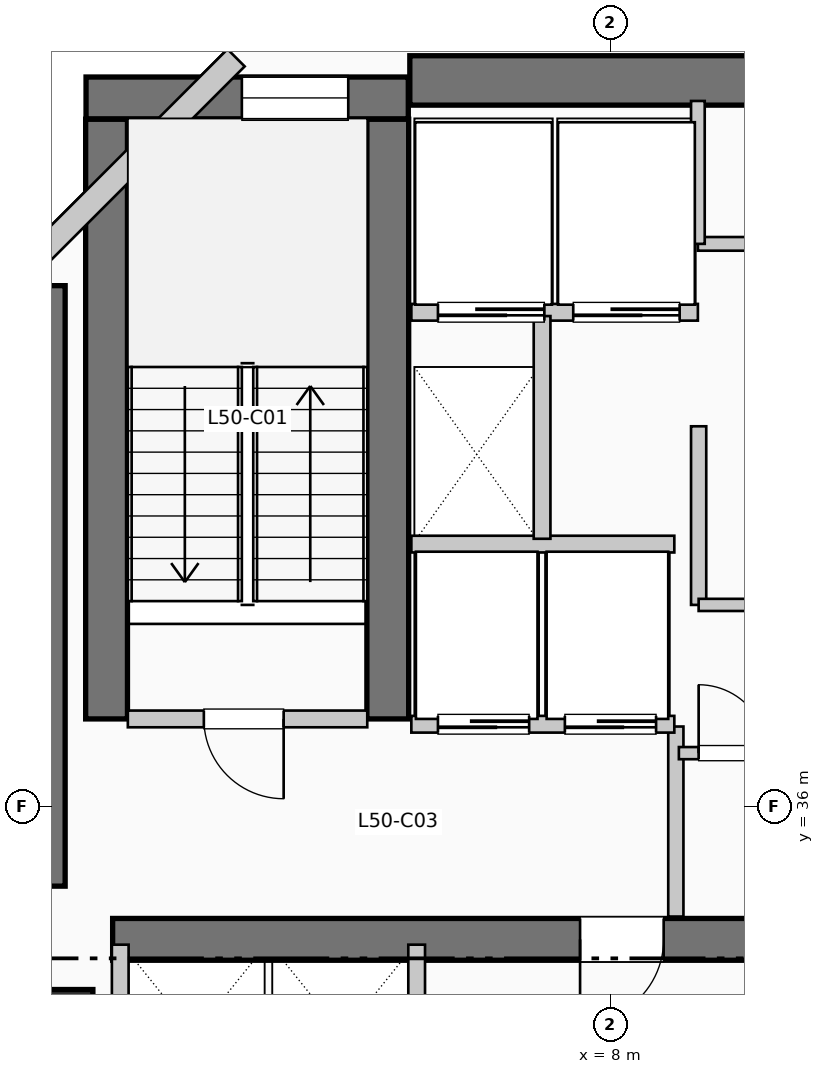
"""IFC4 building model, lengths in metres.
Left out: names, types, materials, properties, quantities, classifications, styles, units other than length and angle.
Written with IfcOpenShell. Run it as: python <this file> out.ifc"""

import sys

from ifc_helpers import new_model, si_unit, direction, frame, frame_2d, origin, origin_2d, place, context, subcontext, project, spatial, rectangle, extrude, element, fill, save


model = new_model("IFC4")
c1 = context("Model", 3, precision=1e-05, world=origin(), true_north=direction((0.0, 1.0)))
c2 = subcontext(c1, "Body", "Model", "MODEL_VIEW")
j1 = project(units=[si_unit("LENGTHUNIT", "METRE"), si_unit("PLANEANGLEUNIT", "RADIAN")], contexts=[c1])
p1 = place(None, origin())
s1 = spatial("IfcSite", under=j1, at=p1, CompositionType="ELEMENT")
p2 = place(p1, origin())
s2 = spatial("IfcBuilding", under=s1, at=p2, CompositionType="ELEMENT")
p3 = place(p2, frame((0.0, 0.0, 207.24)))
s3 = spatial("IfcBuildingStorey", under=s2, at=p3, CompositionType="ELEMENT", Elevation=207.24)
p4 = place(p3, frame((5.36, 45.55, 0.0), z_axis=(0.0, 0.0, 1.0), x_axis=(1.0, 0.0, 0.0)))
e1 = element("IfcWall", 1, at=p4, inside=s3, PredefinedType="SHEAR", context=c2, shape_type="SweptSolid", body=[
    extrude(rectangle(XDim=13.98, YDim=0.65, at=frame_2d((6.99, 0.0))), origin(), (0.0, 0.0, 1.0), 3.96),
])
p5 = place(p3, frame((0.5, 34.95, 0.0), z_axis=(0.0, 0.0, 1.0), x_axis=(0.0, 1.0, 0.0)))
e2 = element("IfcWall", 2, at=p5, inside=s3, PredefinedType="SHEAR", context=c2, shape_type="SweptSolid", body=[
    extrude(rectangle(XDim=7.9, YDim=0.65, at=frame_2d((3.95, 0.0))), origin(), (0.0, 0.0, 1.0), 3.96),
])
p6 = place(p3, frame((1.45, 34.25, 0.0), z_axis=(0.0, 0.0, 1.0), x_axis=(1.0, 0.0, 0.0)))
e3 = element("IfcWall", 3, at=p6, inside=s3, PredefinedType="SHEAR", context=c2, shape_type="SweptSolid", body=[
    extrude(rectangle(XDim=10.71, YDim=0.55, at=frame_2d((5.355, 0.0))), origin(), (0.0, 0.0, 1.0), 3.96),
])
p7 = place(p6, frame((7.25, 0.0, 0.0), z_axis=(0.0, 0.0, 1.0), x_axis=(-1.0, 0.0, 0.0)))
e4 = element("IfcOpeningElement", 4, at=p7, cuts=e3, PredefinedType="OPENING", context=c2, shape_type="SweptSolid", body=[
    extrude(rectangle(XDim=1.1, YDim=2.15, at=frame_2d((0.55, 1.075))), frame((0.0, 0.285, 0.0), z_axis=(0.0, -1.0, 0.0), x_axis=(1.0, 0.0, 0.0)), (0.0, 0.0, 1.0), 0.57),
])
for number, where, z_axis, x_axis in (
    (5, (1.37, 37.15, 0.0), (0.0, 0.0, 1.0), (0.0, 1.0, 0.0)),
    (6, (5.07, 37.15, 0.0), (0.0, 0.0, 1.0), (0.0, 1.0, 0.0)),
):
    element("IfcWall", number, at=place(p3, frame(where, z_axis=z_axis, x_axis=x_axis)), inside=s3, PredefinedType="SHEAR", context=c2, shape_type="SweptSolid", body=[
        extrude(rectangle(XDim=7.89, YDim=0.55, at=frame_2d((3.945, 0.0))), origin(), (0.0, 0.0, 1.0), 3.96),
    ])
p8 = place(p3, frame((1.1, 45.32, 0.0), z_axis=(0.0, 0.0, 1.0), x_axis=(1.0, 0.0, 0.0)))
e7 = element("IfcWall", 7, at=p8, inside=s3, PredefinedType="SHEAR", context=c2, shape_type="SweptSolid", body=[
    extrude(rectangle(XDim=4.24, YDim=0.55, at=frame_2d((2.12, 0.0))), origin(), (0.0, 0.0, 1.0), 3.96),
])
p9 = place(p8, frame((2.05, 0.0, 1.05)))
e8 = element("IfcOpeningElement", 8, at=p9, cuts=e7, PredefinedType="OPENING", context=c2, shape_type="SweptSolid", body=[
    extrude(rectangle(XDim=1.4, YDim=1.8, at=frame_2d((0.7, 0.9))), frame((0.0, 0.285, 0.0), z_axis=(0.0, -1.0, 0.0), x_axis=(1.0, 0.0, 0.0)), (0.0, 0.0, 1.0), 0.57),
])
p10 = place(p3, frame((0.8, 33.2, 0.0), z_axis=(0.0, 0.0, 1.0), x_axis=(1.0, 0.0, 0.0)))
e9 = element("IfcColumn", 9, at=p10, inside=s3, PredefinedType="COLUMN", context=c2, shape_type="SweptSolid", body=[
    extrude(rectangle(XDim=0.78, YDim=0.78, at=origin_2d()), origin(), (0.0, 0.0, 1.0), 3.96),
])
p11 = place(p3, frame((3.074, 45.848, 0.0), z_axis=(0.0, 0.0, 1.0), x_axis=(-0.707106781187, -0.707106781187, 0.0)))
e10 = element("IfcWall", 10, at=p11, inside=s3, PredefinedType="SOLIDWALL", context=c2, shape_type="SweptSolid", body=[
    extrude(rectangle(XDim=4.133, YDim=0.32, at=frame_2d((2.066, 0.0))), origin(), (0.0, 0.0, 1.0), 3.71),
])
p12 = place(p3, frame((1.65, 37.15, 0.0), z_axis=(0.0, 0.0, 1.0), x_axis=(1.0, 0.0, 0.0)))
e11 = element("IfcWall", 11, at=p12, inside=s3, PredefinedType="PARTITIONING", context=c2, shape_type="SweptSolid", body=[
    extrude(rectangle(XDim=3.15, YDim=0.22, at=frame_2d((1.575, 0.0))), origin(), (0.0, 0.0, 1.0), 3.71),
])
p13 = place(p12, frame((2.05, 0.0, 0.0), z_axis=(0.0, 0.0, 1.0), x_axis=(-1.0, 0.0, 0.0)))
e12 = element("IfcOpeningElement", 12, at=p13, cuts=e11, PredefinedType="OPENING", context=c2, shape_type="SweptSolid", body=[
    extrude(rectangle(XDim=1.05, YDim=2.15, at=frame_2d((0.525, 1.075))), frame((0.0, 0.12, 0.0), z_axis=(0.0, -1.0, 0.0), x_axis=(1.0, 0.0, 0.0)), (0.0, 0.0, 1.0), 0.24),
])
p14 = place(p3, frame((8.86, 34.55, 0.0), z_axis=(0.0, 0.0, 1.0), x_axis=(0.0, 1.0, 0.0)))
e13 = element("IfcWall", 13, at=p14, inside=s3, PredefinedType="PARTITIONING", context=c2, shape_type="SweptSolid", body=[
    extrude(rectangle(XDim=2.5, YDim=0.2, at=frame_2d((1.25, 0.0))), origin(), (0.0, 0.0, 1.0), 3.71),
])
p15 = place(p3, frame((5.38, 37.08, 0.0), z_axis=(0.0, 0.0, 1.0), x_axis=(1.0, 0.0, 0.0)))
e14 = element("IfcWall", 14, at=p15, inside=s3, PredefinedType="PARTITIONING", context=c2, shape_type="SweptSolid", body=[
    extrude(rectangle(XDim=3.46, YDim=0.22, at=frame_2d((1.73, 0.0))), origin(), (0.0, 0.0, 1.0), 3.71),
])
p16 = place(p15, frame((1.55, 0.0, 0.0), z_axis=(0.0, 0.0, 1.0), x_axis=(-1.0, 0.0, 0.0)))
e15 = element("IfcOpeningElement", 15, at=p16, cuts=e14, PredefinedType="OPENING", context=c2, shape_type="SweptSolid", body=[
    extrude(rectangle(XDim=1.2, YDim=2.2, at=frame_2d((0.6, 1.1))), frame((0.0, 0.12, 0.0), z_axis=(0.0, -1.0, 0.0), x_axis=(1.0, 0.0, 0.0)), (0.0, 0.0, 1.0), 0.24),
])
p17 = place(p15, frame((3.22, 0.0, 0.0), z_axis=(0.0, 0.0, 1.0), x_axis=(-1.0, 0.0, 0.0)))
e16 = element("IfcOpeningElement", 16, at=p17, cuts=e14, PredefinedType="OPENING", context=c2, shape_type="SweptSolid", body=[
    extrude(rectangle(XDim=1.2, YDim=2.2, at=frame_2d((0.6, 1.1))), frame((0.0, 0.12, 0.0), z_axis=(0.0, -1.0, 0.0), x_axis=(1.0, 0.0, 0.0)), (0.0, 0.0, 1.0), 0.24),
])
p18 = place(p3, frame((5.38, 39.45, 0.0), z_axis=(0.0, 0.0, 1.0), x_axis=(1.0, 0.0, 0.0)))
e17 = element("IfcWall", 17, at=p18, inside=s3, PredefinedType="PARTITIONING", context=c2, shape_type="SweptSolid", body=[
    extrude(rectangle(XDim=3.46, YDim=0.22, at=frame_2d((1.73, 0.0))), origin(), (0.0, 0.0, 1.0), 3.71),
])
p19 = place(p3, frame((5.38, 42.5, 0.0), z_axis=(0.0, 0.0, 1.0), x_axis=(1.0, 0.0, 0.0)))
e18 = element("IfcWall", 18, at=p19, inside=s3, PredefinedType="PARTITIONING", context=c2, shape_type="SweptSolid", body=[
    extrude(rectangle(XDim=3.77, YDim=0.22, at=frame_2d((1.885, 0.0))), origin(), (0.0, 0.0, 1.0), 3.71),
])
p20 = place(p19, frame((1.75, 0.0, 0.0), z_axis=(0.0, 0.0, 1.0), x_axis=(-1.0, 0.0, 0.0)))
e19 = element("IfcOpeningElement", 19, at=p20, cuts=e18, PredefinedType="OPENING", context=c2, shape_type="SweptSolid", body=[
    extrude(rectangle(XDim=1.4, YDim=2.2, at=frame_2d((0.7, 1.1))), frame((0.0, 0.12, 0.0), z_axis=(0.0, -1.0, 0.0), x_axis=(1.0, 0.0, 0.0)), (0.0, 0.0, 1.0), 0.24),
])
p21 = place(p19, frame((3.53, 0.0, 0.0), z_axis=(0.0, 0.0, 1.0), x_axis=(-1.0, 0.0, 0.0)))
e20 = element("IfcOpeningElement", 20, at=p21, cuts=e18, PredefinedType="OPENING", context=c2, shape_type="SweptSolid", body=[
    extrude(rectangle(XDim=1.4, YDim=2.2, at=frame_2d((0.7, 1.1))), frame((0.0, 0.12, 0.0), z_axis=(0.0, -1.0, 0.0), x_axis=(1.0, 0.0, 0.0)), (0.0, 0.0, 1.0), 0.24),
])
p22 = place(p3, frame((7.1, 39.52, 0.0), z_axis=(0.0, 0.0, 1.0), x_axis=(0.0, 1.0, 0.0)))
e21 = element("IfcWall", 21, at=p22, inside=s3, PredefinedType="PARTITIONING", context=c2, shape_type="SweptSolid", body=[
    extrude(rectangle(XDim=2.93, YDim=0.22, at=frame_2d((1.465, 0.0))), origin(), (0.0, 0.0, 1.0), 3.71),
])
for number, where, z_axis, x_axis in (
    (22, (1.55, 31.8, 0.0), (0.0, 0.0, 1.0), (0.0, 1.0, 0.0)),
    (23, (5.45, 31.8, 0.0), (0.0, 0.0, 1.0), (0.0, 1.0, 0.0)),
):
    element("IfcWall", number, at=place(p3, frame(where, z_axis=z_axis, x_axis=x_axis)), inside=s3, PredefinedType="PARTITIONING", context=c2, shape_type="SweptSolid", body=[
        extrude(rectangle(XDim=2.38, YDim=0.22, at=frame_2d((1.19, 0.0))), origin(), (0.0, 0.0, 1.0), 3.71),
    ])
p23 = place(p3, frame((9.16, 38.65, 0.0), z_axis=(0.0, 0.0, 1.0), x_axis=(0.0, 1.0, 0.0)))
e24 = element("IfcWall", 24, at=p23, inside=s3, PredefinedType="PARTITIONING", context=c2, shape_type="SweptSolid", body=[
    extrude(rectangle(XDim=2.35, YDim=0.2, at=frame_2d((1.175, 0.0))), origin(), (0.0, 0.0, 1.0), 3.71),
])
p24 = place(p3, frame((8.9, 36.7, 0.0), z_axis=(0.0, 0.0, 1.0), x_axis=(1.0, 0.0, 0.0)))
e25 = element("IfcWall", 25, at=p24, inside=s3, PredefinedType="PARTITIONING", context=c2, shape_type="SweptSolid", body=[
    extrude(rectangle(XDim=3.25, YDim=0.16, at=frame_2d((1.625, 0.0))), origin(), (0.0, 0.0, 1.0), 3.71),
])
p25 = place(p24, frame((0.26, 0.0, 0.0)))
e26 = element("IfcOpeningElement", 26, at=p25, cuts=e25, PredefinedType="OPENING", context=c2, shape_type="SweptSolid", body=[
    extrude(rectangle(XDim=0.9, YDim=2.15, at=frame_2d((0.45, 1.075))), frame((0.0, 0.09, 0.0), z_axis=(0.0, -1.0, 0.0), x_axis=(1.0, 0.0, 0.0)), (0.0, 0.0, 1.0), 0.18),
])
p26 = place(p24, frame((1.68, 0.0, 0.0)))
e27 = element("IfcOpeningElement", 27, at=p26, cuts=e25, PredefinedType="OPENING", context=c2, shape_type="SweptSolid", body=[
    extrude(rectangle(XDim=0.9, YDim=2.15, at=frame_2d((0.45, 1.075))), frame((0.0, 0.09, 0.0), z_axis=(0.0, -1.0, 0.0), x_axis=(1.0, 0.0, 0.0)), (0.0, 0.0, 1.0), 0.18),
])
p27 = place(p3, frame((9.16, 38.65, 0.0), z_axis=(0.0, 0.0, 1.0), x_axis=(1.0, 0.0, 0.0)))
e28 = element("IfcWall", 28, at=p27, inside=s3, PredefinedType="PARTITIONING", context=c2, shape_type="SweptSolid", body=[
    extrude(rectangle(XDim=3.42, YDim=0.16, at=frame_2d((1.71, 0.0))), origin(), (0.0, 0.0, 1.0), 3.71),
])
p28 = place(p27, frame((2.15, 0.0, 0.0), z_axis=(0.0, 0.0, 1.0), x_axis=(-1.0, 0.0, 0.0)))
e29 = element("IfcOpeningElement", 29, at=p28, cuts=e28, PredefinedType="OPENING", context=c2, shape_type="SweptSolid", body=[
    extrude(rectangle(XDim=0.95, YDim=2.15, at=frame_2d((0.475, 1.075))), frame((0.0, 0.09, 0.0), z_axis=(0.0, -1.0, 0.0), x_axis=(1.0, 0.0, 0.0)), (0.0, 0.0, 1.0), 0.18),
])
p29 = place(p3, frame((9.15, 43.4, 0.0), z_axis=(0.0, 0.0, 1.0), x_axis=(1.0, 0.0, 0.0)))
e30 = element("IfcWall", 30, at=p29, inside=s3, PredefinedType="PLUMBINGWALL", context=c2, shape_type="SweptSolid", body=[
    extrude(rectangle(XDim=9.33, YDim=0.18, at=frame_2d((4.665, 0.0))), origin(), (0.0, 0.0, 1.0), 3.71),
])
p30 = place(p29, frame((1.88, 0.0, 0.0)))
e31 = element("IfcOpeningElement", 31, at=p30, cuts=e30, PredefinedType="OPENING", context=c2, shape_type="SweptSolid", body=[
    extrude(rectangle(XDim=0.92, YDim=2.1, at=frame_2d((0.46, 1.05))), frame((0.0, 0.1, 0.0), z_axis=(0.0, -1.0, 0.0), x_axis=(1.0, 0.0, 0.0)), (0.0, 0.0, 1.0), 0.2),
])
p31 = place(p29, frame((6.515, 0.0, 0.0)))
e32 = element("IfcOpeningElement", 32, at=p31, cuts=e30, PredefinedType="OPENING", context=c2, shape_type="SweptSolid", body=[
    extrude(rectangle(XDim=0.92, YDim=2.1, at=frame_2d((0.46, 1.05))), frame((0.0, 0.1, 0.0), z_axis=(0.0, -1.0, 0.0), x_axis=(1.0, 0.0, 0.0)), (0.0, 0.0, 1.0), 0.2),
])
p32 = place(p3, frame((9.15, 43.4, 0.0), z_axis=(0.0, 0.0, 1.0), x_axis=(0.0, 1.0, 0.0)))
e33 = element("IfcWall", 33, at=p32, inside=s3, PredefinedType="PLUMBINGWALL", context=c2, shape_type="SweptSolid", body=[
    extrude(rectangle(XDim=1.88, YDim=0.18, at=frame_2d((0.94, 0.0))), origin(), (0.0, 0.0, 1.0), 3.71),
])
p33 = place(p9, origin())
e34 = element("IfcWindow", 34, at=p33, inside=s3, PartitioningType="SINGLE_PANEL", PredefinedType="WINDOW", context=c2, shape_type="SweptSolid", body=[
    extrude(rectangle(XDim=1.4, YDim=1.8, at=frame_2d((0.7, 0.9))), frame((0.0, 0.03, 0.0), z_axis=(0.0, -1.0, 0.0), x_axis=(1.0, 0.0, 0.0)), (0.0, 0.0, 1.0), 0.06),
])
fill(e8, e34)
p34 = place(p13, origin())
e35 = element("IfcDoor", 35, at=p34, inside=s3, OperationType="SINGLE_SWING_RIGHT", PredefinedType="DOOR", context=c2, shape_type="SweptSolid", body=[
    extrude(rectangle(XDim=1.05, YDim=2.15, at=frame_2d((0.525, 1.075))), frame((0.0, 0.025, 0.0), z_axis=(0.0, -1.0, 0.0), x_axis=(1.0, 0.0, 0.0)), (0.0, 0.0, 1.0), 0.05),
])
fill(e12, e35)
p35 = place(p7, origin())
e36 = element("IfcDoor", 36, at=p35, inside=s3, OperationType="SINGLE_SWING_LEFT", PredefinedType="DOOR", context=c2, shape_type="SweptSolid", body=[
    extrude(rectangle(XDim=1.1, YDim=2.15, at=frame_2d((0.55, 1.075))), frame((0.0, 0.025, 0.0), z_axis=(0.0, -1.0, 0.0), x_axis=(1.0, 0.0, 0.0)), (0.0, 0.0, 1.0), 0.05),
])
fill(e4, e36)
p36 = place(p16, origin())
e37 = element("IfcDoor", 37, at=p36, inside=s3, OperationType="SLIDING_TO_RIGHT", PredefinedType="DOOR", context=c2, shape_type="SweptSolid", body=[
    extrude(rectangle(XDim=1.2, YDim=2.2, at=frame_2d((0.6, 1.1))), frame((0.0, 0.025, 0.0), z_axis=(0.0, -1.0, 0.0), x_axis=(1.0, 0.0, 0.0)), (0.0, 0.0, 1.0), 0.05),
])
fill(e15, e37)
p37 = place(p17, origin())
e38 = element("IfcDoor", 38, at=p37, inside=s3, OperationType="SLIDING_TO_RIGHT", PredefinedType="DOOR", context=c2, shape_type="SweptSolid", body=[
    extrude(rectangle(XDim=1.2, YDim=2.2, at=frame_2d((0.6, 1.1))), frame((0.0, 0.025, 0.0), z_axis=(0.0, -1.0, 0.0), x_axis=(1.0, 0.0, 0.0)), (0.0, 0.0, 1.0), 0.05),
])
fill(e16, e38)
p38 = place(p20, origin())
e39 = element("IfcDoor", 39, at=p38, inside=s3, OperationType="SLIDING_TO_LEFT", PredefinedType="DOOR", context=c2, shape_type="SweptSolid", body=[
    extrude(rectangle(XDim=1.4, YDim=2.2, at=frame_2d((0.7, 1.1))), frame((0.0, 0.025, 0.0), z_axis=(0.0, -1.0, 0.0), x_axis=(1.0, 0.0, 0.0)), (0.0, 0.0, 1.0), 0.05),
])
fill(e19, e39)
p39 = place(p21, origin())
e40 = element("IfcDoor", 40, at=p39, inside=s3, OperationType="SLIDING_TO_LEFT", PredefinedType="DOOR", context=c2, shape_type="SweptSolid", body=[
    extrude(rectangle(XDim=1.4, YDim=2.2, at=frame_2d((0.7, 1.1))), frame((0.0, 0.025, 0.0), z_axis=(0.0, -1.0, 0.0), x_axis=(1.0, 0.0, 0.0)), (0.0, 0.0, 1.0), 0.05),
])
fill(e20, e40)
p40 = place(p25, origin())
e41 = element("IfcDoor", 41, at=p40, inside=s3, OperationType="SINGLE_SWING_LEFT", PredefinedType="DOOR", context=c2, shape_type="SweptSolid", body=[
    extrude(rectangle(XDim=0.9, YDim=2.15, at=frame_2d((0.45, 1.075))), frame((0.0, 0.025, 0.0), z_axis=(0.0, -1.0, 0.0), x_axis=(1.0, 0.0, 0.0)), (0.0, 0.0, 1.0), 0.05),
])
fill(e26, e41)
save(model, sys.argv[1])
